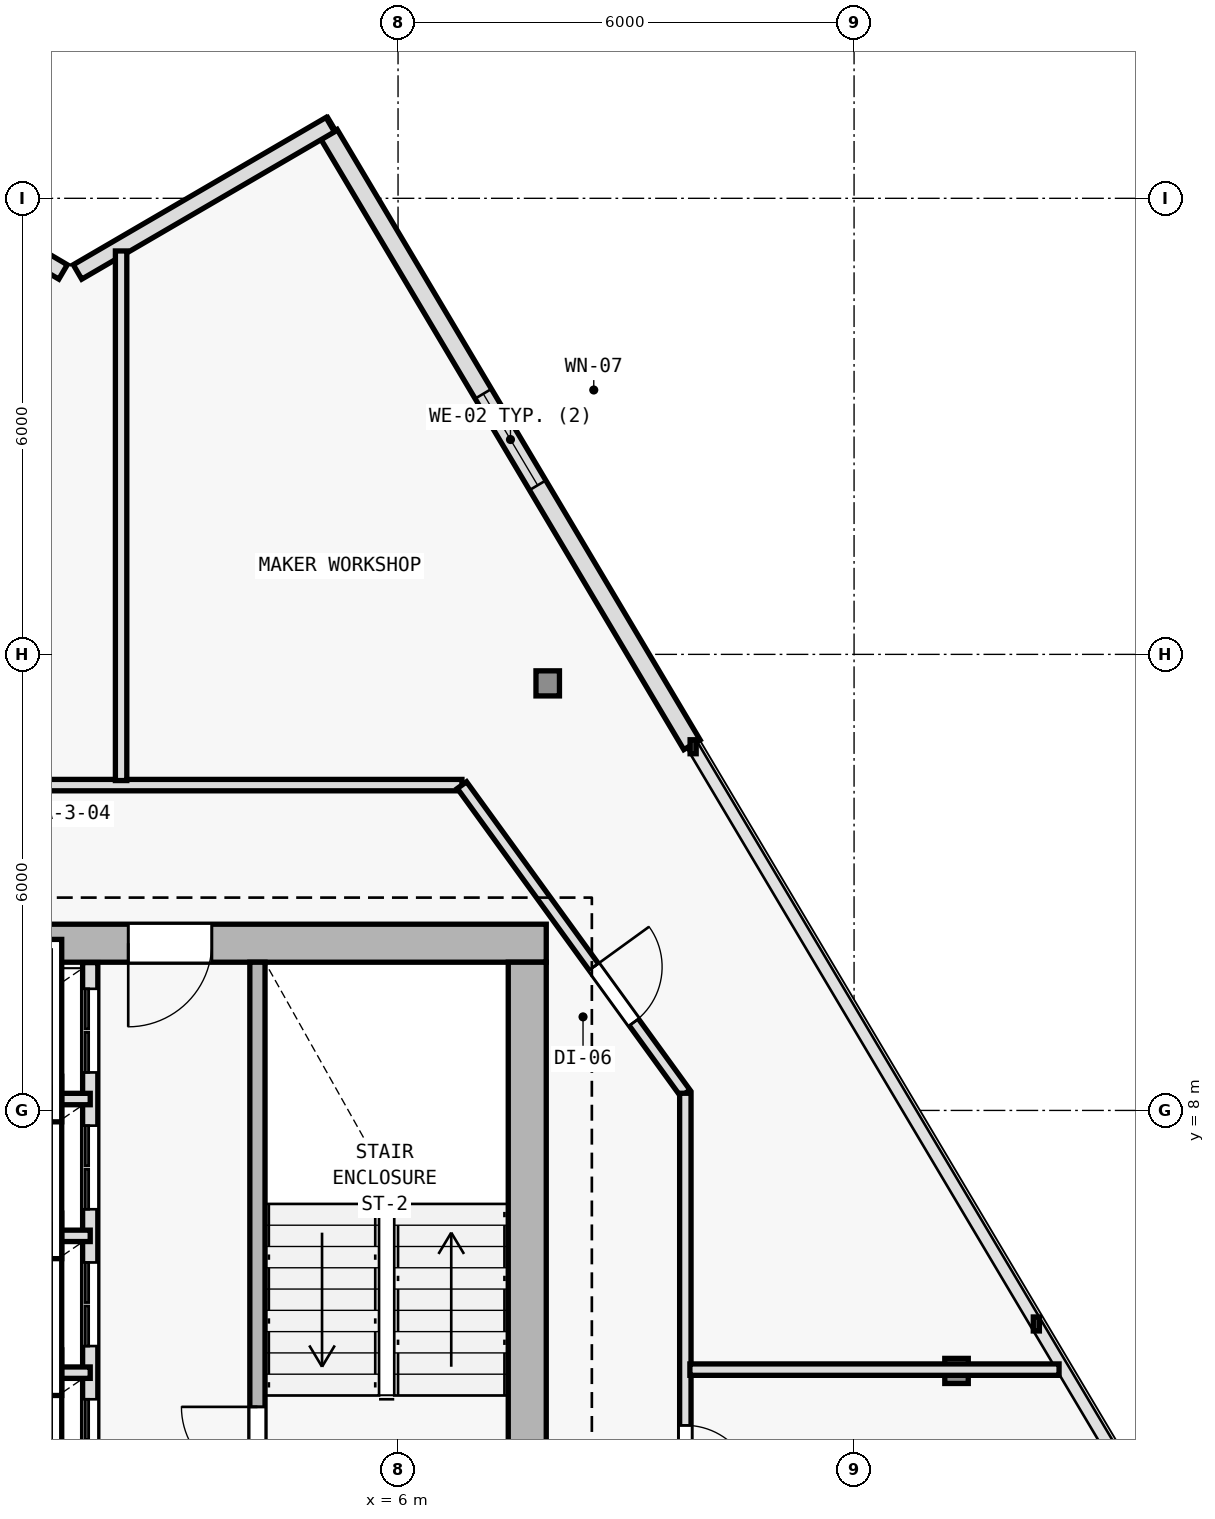
"""IFC4 building model, lengths in metres.
Left out: names, types, materials, properties, quantities, classifications, styles, units other than length and angle.
Written with IfcOpenShell. Run it as: python <this file> out.ifc"""

import sys

from ifc_helpers import new_model, si_unit, direction, frame, frame_2d, origin, origin_2d, place, context, subcontext, project, spatial, rectangle, i_section, extrude, element, fill, save


model = new_model("IFC4")
c1 = context("Model", 3, precision=1e-05, world=origin(), true_north=direction((0.0, 1.0)))
c2 = subcontext(c1, "Body", "Model", "MODEL_VIEW")
j1 = project(units=[si_unit("LENGTHUNIT", "METRE"), si_unit("PLANEANGLEUNIT", "RADIAN")], contexts=[c1])
p1 = place(None, origin())
s1 = spatial("IfcSite", under=j1, at=p1, CompositionType="ELEMENT")
p2 = place(p1, origin())
s2 = spatial("IfcBuilding", under=s1, at=p2, CompositionType="ELEMENT")
p3 = place(p2, frame((0.0, 0.0, 283.2)))
s3 = spatial("IfcBuildingStorey", under=s2, at=p3, CompositionType="ELEMENT", Elevation=283.2)
p4 = place(p3, frame((7.7, 10.2, 0.0), z_axis=(0.0, 0.0, 1.0), x_axis=(1.0, 0.0, 0.0)))
e1 = element("IfcColumn", 1, at=p4, inside=s3, PredefinedType="COLUMN", context=c2, shape_type="SweptSolid", body=[
    extrude(i_section(OverallWidth=0.374, OverallDepth=0.372, WebThickness=0.012, FlangeThickness=0.02, FilletRadius=0.015, at=origin_2d()), origin(), (0.0, 0.0, 1.0), 3.6),
])
p5 = place(p3, frame((13.348, 4.573, 0.006), z_axis=(-0.018907326549, 0.00952167524, 0.999775900241), x_axis=(-0.449781931574, -0.893138406984, 0.0)))
e2 = element("IfcColumn", 2, at=p5, inside=s3, PredefinedType="COLUMN", context=c2, shape_type="SweptSolid", body=[
    extrude(i_section(OverallWidth=0.309, OverallDepth=0.33, WebThickness=0.011, FlangeThickness=0.019, FilletRadius=0.027, at=origin_2d()), origin(), (0.0, 0.0, 1.0), 3.59),
])
p6 = place(p3, frame((7.969, 13.618, 0.006), z_axis=(-0.011699842352, -0.002516826552, 0.999928387072), x_axis=(0.210305364179, -0.977635746993, 0.0)))
e3 = element("IfcColumn", 3, at=p6, inside=s3, PredefinedType="COLUMN", context=c2, shape_type="SweptSolid", body=[
    extrude(i_section(OverallWidth=0.309, OverallDepth=0.33, WebThickness=0.011, FlangeThickness=0.019, FilletRadius=0.027, at=origin_2d()), origin(), (0.0, 0.0, 1.0), 3.589),
])
p7 = place(p3, frame((5.091, 20.842, 0.0), z_axis=(0.0, 0.0, 1.0), x_axis=(0.511095217069, -0.859524100354, 0.0)))
e4 = element("IfcWall", 4, at=p7, inside=s3, PredefinedType="SOLIDWALL", context=c2, shape_type="SweptSolid", body=[
    extrude(rectangle(XDim=9.344, YDim=0.25, at=frame_2d((4.672, 0.0))), origin(), (0.0, 0.0, 1.0), 3.35),
])
p8 = place(p7, frame((3.972, 0.0, 0.62)))
e5 = element("IfcOpeningElement", 5, at=p8, cuts=e4, PredefinedType="OPENING", context=c2, shape_type="SweptSolid", body=[
    extrude(rectangle(XDim=1.4, YDim=2.0, at=frame_2d((0.7, 1.0))), frame((0.0, 0.135, 0.0), z_axis=(0.0, -1.0, 0.0), x_axis=(1.0, 0.0, 0.0)), (0.0, 0.0, 1.0), 0.27),
])
p9 = place(p3, frame((1.783, 19.031, 0.0), z_axis=(0.0, 0.0, 1.0), x_axis=(0.863972097652, 0.503539685108, 0.0)))
e6 = element("IfcWall", 6, at=p9, inside=s3, PredefinedType="SOLIDWALL", context=c2, shape_type="SweptSolid", body=[
    extrude(rectangle(XDim=3.849, YDim=0.22, at=frame_2d((1.924, 0.0))), origin(), (0.0, 0.0, 1.0), 3.35),
])
p10 = place(p3, frame((-2.074, 21.186, 0.0), z_axis=(0.0, 0.0, 1.0), x_axis=(0.862137800155, -0.506673872964, 0.0)))
e7 = element("IfcWall", 7, at=p10, inside=s3, PredefinedType="SOLIDWALL", context=c2, shape_type="SweptSolid", body=[
    extrude(rectangle(XDim=4.253, YDim=0.22, at=frame_2d((2.126, 0.0))), origin(), (0.0, 0.0, 1.0), 3.35),
])
p11 = place(p10, frame((1.576, 0.0, 0.62)))
e8 = element("IfcOpeningElement", 8, at=p11, cuts=e7, PredefinedType="OPENING", context=c2, shape_type="SweptSolid", body=[
    extrude(rectangle(XDim=1.1, YDim=1.8, at=frame_2d((0.55, 0.9))), frame((0.0, 0.12, 0.0), z_axis=(0.0, -1.0, 0.0), x_axis=(1.0, 0.0, 0.0)), (0.0, 0.0, 1.0), 0.24),
])
p12 = place(p3, frame((7.95, 10.2, 0.0), z_axis=(0.0, 0.0, 1.0), x_axis=(-1.0, 0.0, 0.0)))
e9 = element("IfcWall", 9, at=p12, inside=s3, PredefinedType="SHEAR", context=c2, shape_type="SweptSolid", body=[
    extrude(rectangle(XDim=15.9, YDim=0.5, at=frame_2d((7.95, 0.0))), origin(), (0.0, 0.0, 1.0), 3.35),
])
p13 = place(p12, frame((4.4, 0.0, 0.0)))
e10 = element("IfcOpeningElement", 10, at=p13, cuts=e9, PredefinedType="OPENING", context=c2, shape_type="SweptSolid", body=[
    extrude(rectangle(XDim=1.1, YDim=2.15, at=frame_2d((0.55, 1.075))), frame((0.0, 0.26, 0.0), z_axis=(0.0, -1.0, 0.0), x_axis=(1.0, 0.0, 0.0)), (0.0, 0.0, 1.0), 0.52),
])
p14 = place(p3, frame((7.7, 9.95, 0.0), z_axis=(0.0, 0.0, 1.0), x_axis=(0.0, -1.0, 0.0)))
e11 = element("IfcWall", 11, at=p14, inside=s3, PredefinedType="SHEAR", context=c2, shape_type="SweptSolid", body=[
    extrude(rectangle(XDim=19.1, YDim=0.5, at=frame_2d((9.55, 0.0))), origin(), (0.0, 0.0, 1.0), 3.35),
])
p15 = place(p3, frame((4.15, 2.75, 0.0), z_axis=(0.0, 0.0, 1.0), x_axis=(0.0, 1.0, 0.0)))
e12 = element("IfcWall", 12, at=p15, inside=s3, PredefinedType="SOLIDWALL", context=c2, shape_type="SweptSolid", body=[
    extrude(rectangle(XDim=7.2, YDim=0.2, at=frame_2d((3.6, 0.0))), origin(), (0.0, 0.0, 1.0), 3.35),
])
p16 = place(p15, frame((0.35, 0.0, 0.0)))
e13 = element("IfcOpeningElement", 13, at=p16, cuts=e12, PredefinedType="OPENING", context=c2, shape_type="SweptSolid", body=[
    extrude(rectangle(XDim=1.0, YDim=2.15, at=frame_2d((0.5, 1.075))), frame((0.0, 0.11, 0.0), z_axis=(0.0, -1.0, 0.0), x_axis=(1.0, 0.0, 0.0)), (0.0, 0.0, 1.0), 0.22),
])
p17 = place(p3, frame((1.95, 2.65, 0.0), z_axis=(0.0, 0.0, 1.0), x_axis=(0.0, 1.0, 0.0)))
e14 = element("IfcWall", 14, at=p17, inside=s3, PredefinedType="SOLIDWALL", context=c2, shape_type="SweptSolid", body=[
    extrude(rectangle(XDim=7.295, YDim=0.2, at=frame_2d((3.647, 0.0))), origin(), (0.0, 0.0, 1.0), 3.35),
])
p18 = place(p17, frame((0.45, 0.0, 0.0)))
e15 = element("IfcOpeningElement", 15, at=p18, cuts=e14, PredefinedType="OPENING", context=c2, shape_type="SweptSolid", body=[
    extrude(rectangle(XDim=1.1, YDim=2.15, at=frame_2d((0.55, 1.075))), frame((0.0, 0.11, 0.0), z_axis=(0.0, -1.0, 0.0), x_axis=(1.0, 0.0, 0.0)), (0.0, 0.0, 1.0), 0.22),
])
p19 = place(p17, frame((2.25, 0.0, 0.0)))
e16 = element("IfcOpeningElement", 16, at=p19, cuts=e14, PredefinedType="OPENING", context=c2, shape_type="SweptSolid", body=[
    extrude(rectangle(XDim=1.1, YDim=2.15, at=frame_2d((0.55, 1.075))), frame((0.0, 0.11, 0.0), z_axis=(0.0, -1.0, 0.0), x_axis=(1.0, 0.0, 0.0)), (0.0, 0.0, 1.0), 0.22),
])
p20 = place(p17, frame((4.05, 0.0, 0.0)))
e17 = element("IfcOpeningElement", 17, at=p20, cuts=e14, PredefinedType="OPENING", context=c2, shape_type="SweptSolid", body=[
    extrude(rectangle(XDim=1.1, YDim=2.15, at=frame_2d((0.55, 1.075))), frame((0.0, 0.11, 0.0), z_axis=(0.0, -1.0, 0.0), x_axis=(1.0, 0.0, 0.0)), (0.0, 0.0, 1.0), 0.22),
])
p21 = place(p17, frame((5.85, 0.0, 0.0)))
e18 = element("IfcOpeningElement", 18, at=p21, cuts=e14, PredefinedType="OPENING", context=c2, shape_type="SweptSolid", body=[
    extrude(rectangle(XDim=1.1, YDim=2.15, at=frame_2d((0.55, 1.075))), frame((0.0, 0.11, 0.0), z_axis=(0.0, -1.0, 0.0), x_axis=(1.0, 0.0, 0.0)), (0.0, 0.0, 1.0), 0.22),
])
for number, where, z_axis, x_axis in (
    (19, (-0.75, 4.55, 0.0), (0.0, 0.0, 1.0), (1.0, 0.0, 0.0)),
    (20, (-0.75, 6.35, 0.0), (0.0, 0.0, 1.0), (1.0, 0.0, 0.0)),
    (21, (-0.75, 8.15, 0.0), (0.0, 0.0, 1.0), (1.0, 0.0, 0.0)),
):
    element("IfcWall", number, at=place(p3, frame(where, z_axis=z_axis, x_axis=x_axis)), inside=s3, PredefinedType="PARTITIONING", context=c2, shape_type="SweptSolid", body=[
        extrude(rectangle(XDim=2.7, YDim=0.15, at=frame_2d((1.35, 0.0))), origin(), (0.0, 0.0, 1.0), 3.35),
    ])
p22 = place(p3, frame((-6.841, 12.28, 0.0), z_axis=(0.0, 0.0, 1.0), x_axis=(1.0, 0.0, 0.0)))
e22 = element("IfcWall", 22, at=p22, inside=s3, PredefinedType="PARTITIONING", context=c2, shape_type="SweptSolid", body=[
    extrude(rectangle(XDim=13.682, YDim=0.15, at=frame_2d((6.841, 0.0))), origin(), (0.0, 0.0, 1.0), 3.015),
])
p23 = place(p22, frame((4.238, 0.0, 0.0)))
e23 = element("IfcOpeningElement", 23, at=p23, cuts=e22, PredefinedType="OPENING", context=c2, shape_type="SweptSolid", body=[
    extrude(rectangle(XDim=0.9, YDim=2.1, at=frame_2d((0.45, 1.05))), frame((0.0, 0.085, 0.0), z_axis=(0.0, -1.0, 0.0), x_axis=(1.0, 0.0, 0.0)), (0.0, 0.0, 1.0), 0.17),
])
p24 = place(p3, frame((6.841, 12.28, 0.0), z_axis=(0.0, 0.0, 1.0), x_axis=(0.586956386413, -0.809618552436, 0.0)))
e24 = element("IfcWall", 24, at=p24, inside=s3, PredefinedType="PARTITIONING", context=c2, shape_type="SweptSolid", body=[
    extrude(rectangle(XDim=5.008, YDim=0.15, at=frame_2d((2.504, 0.0))), origin(), (0.0, 0.0, 1.0), 2.775),
])
p25 = place(p24, frame((2.954, 0.0, 0.0)))
e25 = element("IfcOpeningElement", 25, at=p25, cuts=e24, PredefinedType="OPENING", context=c2, shape_type="SweptSolid", body=[
    extrude(rectangle(XDim=0.9, YDim=2.1, at=frame_2d((0.45, 1.05))), frame((0.0, 0.085, 0.0), z_axis=(0.0, -1.0, 0.0), x_axis=(1.0, 0.0, 0.0)), (0.0, 0.0, 1.0), 0.17),
])
p26 = place(p3, frame((9.78, 8.226, 0.0), z_axis=(0.0, 0.0, 1.0), x_axis=(0.0, -1.0, 0.0)))
e26 = element("IfcWall", 26, at=p26, inside=s3, PredefinedType="PARTITIONING", context=c2, shape_type="SweptSolid", body=[
    extrude(rectangle(XDim=19.706, YDim=0.15, at=frame_2d((9.853, 0.0))), origin(), (0.0, 0.0, 1.0), 2.775),
])
p27 = place(p26, frame((17.333, 0.0, 0.0)))
e27 = element("IfcOpeningElement", 27, at=p27, cuts=e26, PredefinedType="OPENING", context=c2, shape_type="SweptSolid", body=[
    extrude(rectangle(XDim=0.9, YDim=2.1, at=frame_2d((0.45, 1.05))), frame((0.0, 0.085, 0.0), z_axis=(0.0, -1.0, 0.0), x_axis=(1.0, 0.0, 0.0)), (0.0, 0.0, 1.0), 0.17),
])
p28 = place(p26, frame((14.78, 0.0, 0.0)))
e28 = element("IfcOpeningElement", 28, at=p28, cuts=e26, PredefinedType="OPENING", context=c2, shape_type="SweptSolid", body=[
    extrude(rectangle(XDim=0.85, YDim=2.1, at=frame_2d((0.425, 1.05))), frame((0.0, 0.085, 0.0), z_axis=(0.0, -1.0, 0.0), x_axis=(1.0, 0.0, 0.0)), (0.0, 0.0, 1.0), 0.17),
])
p29 = place(p26, frame((13.091, 0.0, 0.0)))
e29 = element("IfcOpeningElement", 29, at=p29, cuts=e26, PredefinedType="OPENING", context=c2, shape_type="SweptSolid", body=[
    extrude(rectangle(XDim=0.85, YDim=2.1, at=frame_2d((0.425, 1.05))), frame((0.0, 0.085, 0.0), z_axis=(0.0, -1.0, 0.0), x_axis=(1.0, 0.0, 0.0)), (0.0, 0.0, 1.0), 0.17),
])
p30 = place(p26, frame((11.397, 0.0, 0.0)))
e30 = element("IfcOpeningElement", 30, at=p30, cuts=e26, PredefinedType="OPENING", context=c2, shape_type="SweptSolid", body=[
    extrude(rectangle(XDim=0.85, YDim=2.1, at=frame_2d((0.425, 1.05))), frame((0.0, 0.085, 0.0), z_axis=(0.0, -1.0, 0.0), x_axis=(1.0, 0.0, 0.0)), (0.0, 0.0, 1.0), 0.17),
])
p31 = place(p26, frame((9.138, 0.0, 0.0)))
e31 = element("IfcOpeningElement", 31, at=p31, cuts=e26, PredefinedType="OPENING", context=c2, shape_type="SweptSolid", body=[
    extrude(rectangle(XDim=0.9, YDim=2.1, at=frame_2d((0.45, 1.05))), frame((0.0, 0.085, 0.0), z_axis=(0.0, -1.0, 0.0), x_axis=(1.0, 0.0, 0.0)), (0.0, 0.0, 1.0), 0.17),
])
p32 = place(p26, frame((6.661, 0.0, 0.0)))
e32 = element("IfcOpeningElement", 32, at=p32, cuts=e26, PredefinedType="OPENING", context=c2, shape_type="SweptSolid", body=[
    extrude(rectangle(XDim=0.9, YDim=2.1, at=frame_2d((0.45, 1.05))), frame((0.0, 0.085, 0.0), z_axis=(0.0, -1.0, 0.0), x_axis=(1.0, 0.0, 0.0)), (0.0, 0.0, 1.0), 0.17),
])
p33 = place(p26, frame((4.369, 0.0, 0.0)))
e33 = element("IfcOpeningElement", 33, at=p33, cuts=e26, PredefinedType="OPENING", context=c2, shape_type="SweptSolid", body=[
    extrude(rectangle(XDim=0.9, YDim=2.1, at=frame_2d((0.45, 1.05))), frame((0.0, 0.085, 0.0), z_axis=(0.0, -1.0, 0.0), x_axis=(1.0, 0.0, 0.0)), (0.0, 0.0, 1.0), 0.17),
])
p34 = place(p3, frame((9.84, 4.59, 0.0), z_axis=(0.0, 0.0, 1.0), x_axis=(1.0, 0.0, 0.0)))
e34 = element("IfcWall", 34, at=p34, inside=s3, PredefinedType="PARTITIONING", context=c2, shape_type="SweptSolid", body=[
    extrude(rectangle(XDim=4.857, YDim=0.15, at=frame_2d((2.428, 0.0))), origin(), (0.0, 0.0, 1.0), 2.775),
])
p35 = place(p3, frame((2.356, 12.34, 0.0), z_axis=(0.0, 0.0, 1.0), x_axis=(0.0, 1.0, 0.0)))
e35 = element("IfcWall", 35, at=p35, inside=s3, PredefinedType="PARTITIONING", context=c2, shape_type="SweptSolid", body=[
    extrude(rectangle(XDim=6.967, YDim=0.15, at=frame_2d((3.484, 0.0))), origin(), (0.0, 0.0, 1.0), 3.015),
])
p36 = place(p8, origin())
e36 = element("IfcWindow", 36, at=p36, inside=s3, PartitioningType="SINGLE_PANEL", PredefinedType="WINDOW", context=c2, shape_type="SweptSolid", body=[
    extrude(rectangle(XDim=1.4, YDim=2.0, at=frame_2d((0.7, 1.0))), frame((0.0, 0.03, 0.0), z_axis=(0.0, -1.0, 0.0), x_axis=(1.0, 0.0, 0.0)), (0.0, 0.0, 1.0), 0.06),
])
fill(e5, e36)
p37 = place(p13, origin())
e37 = element("IfcDoor", 37, at=p37, inside=s3, OperationType="SINGLE_SWING_RIGHT", PredefinedType="DOOR", context=c2, shape_type="SweptSolid", body=[
    extrude(rectangle(XDim=1.1, YDim=2.15, at=frame_2d((0.55, 1.075))), frame((0.0, 0.025, 0.0), z_axis=(0.0, -1.0, 0.0), x_axis=(1.0, 0.0, 0.0)), (0.0, 0.0, 1.0), 0.05),
])
fill(e10, e37)
p38 = place(p16, origin())
e38 = element("IfcDoor", 38, at=p38, inside=s3, OperationType="SINGLE_SWING_RIGHT", PredefinedType="DOOR", context=c2, shape_type="SweptSolid", body=[
    extrude(rectangle(XDim=1.0, YDim=2.15, at=frame_2d((0.5, 1.075))), frame((0.0, 0.025, 0.0), z_axis=(0.0, -1.0, 0.0), x_axis=(1.0, 0.0, 0.0)), (0.0, 0.0, 1.0), 0.05),
])
fill(e13, e38)
p39 = place(p18, origin())
e39 = element("IfcDoor", 39, at=p39, inside=s3, OperationType="DOUBLE_DOOR_SLIDING", PredefinedType="DOOR", context=c2, shape_type="SweptSolid", body=[
    extrude(rectangle(XDim=1.1, YDim=2.15, at=frame_2d((0.55, 1.075))), frame((0.0, 0.025, 0.0), z_axis=(0.0, -1.0, 0.0), x_axis=(1.0, 0.0, 0.0)), (0.0, 0.0, 1.0), 0.05),
])
fill(e15, e39)
p40 = place(p19, origin())
e40 = element("IfcDoor", 40, at=p40, inside=s3, OperationType="DOUBLE_DOOR_SLIDING", PredefinedType="DOOR", context=c2, shape_type="SweptSolid", body=[
    extrude(rectangle(XDim=1.1, YDim=2.15, at=frame_2d((0.55, 1.075))), frame((0.0, 0.025, 0.0), z_axis=(0.0, -1.0, 0.0), x_axis=(1.0, 0.0, 0.0)), (0.0, 0.0, 1.0), 0.05),
])
fill(e16, e40)
p41 = place(p20, origin())
e41 = element("IfcDoor", 41, at=p41, inside=s3, OperationType="DOUBLE_DOOR_SLIDING", PredefinedType="DOOR", context=c2, shape_type="SweptSolid", body=[
    extrude(rectangle(XDim=1.1, YDim=2.15, at=frame_2d((0.55, 1.075))), frame((0.0, 0.025, 0.0), z_axis=(0.0, -1.0, 0.0), x_axis=(1.0, 0.0, 0.0)), (0.0, 0.0, 1.0), 0.05),
])
fill(e17, e41)
p42 = place(p21, origin())
e42 = element("IfcDoor", 42, at=p42, inside=s3, OperationType="DOUBLE_DOOR_SLIDING", PredefinedType="DOOR", context=c2, shape_type="SweptSolid", body=[
    extrude(rectangle(XDim=1.1, YDim=2.15, at=frame_2d((0.55, 1.075))), frame((0.0, 0.025, 0.0), z_axis=(0.0, -1.0, 0.0), x_axis=(1.0, 0.0, 0.0)), (0.0, 0.0, 1.0), 0.05),
])
fill(e18, e42)
p43 = place(p33, origin())
e43 = element("IfcDoor", 43, at=p43, inside=s3, OperationType="SINGLE_SWING_RIGHT", PredefinedType="DOOR", context=c2, shape_type="SweptSolid", body=[
    extrude(rectangle(XDim=0.9, YDim=2.1, at=frame_2d((0.45, 1.05))), frame((0.0, 0.025, 0.0), z_axis=(0.0, -1.0, 0.0), x_axis=(1.0, 0.0, 0.0)), (0.0, 0.0, 1.0), 0.05),
])
fill(e33, e43)
p44 = place(p25, origin())
e44 = element("IfcDoor", 44, at=p44, inside=s3, OperationType="SINGLE_SWING_LEFT", PredefinedType="DOOR", context=c2, shape_type="SweptSolid", body=[
    extrude(rectangle(XDim=0.9, YDim=2.1, at=frame_2d((0.45, 1.05))), frame((0.0, 0.025, 0.0), z_axis=(0.0, -1.0, 0.0), x_axis=(1.0, 0.0, 0.0)), (0.0, 0.0, 1.0), 0.05),
])
fill(e25, e44)
save(model, sys.argv[1])
